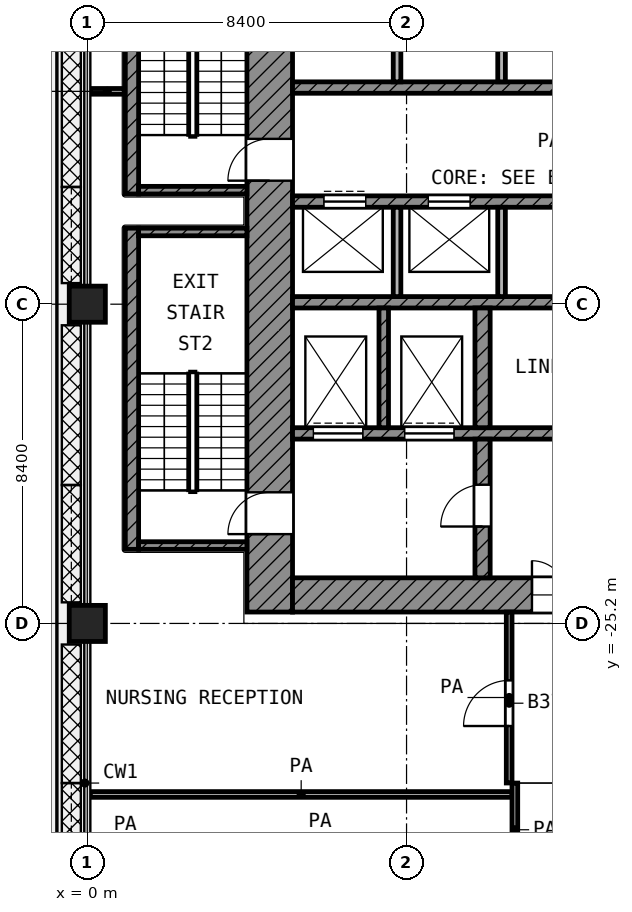
"""IFC4 building model, lengths in metres.
Left out: names, types, materials, properties, quantities, classifications, styles, units other than length and angle.
Written with IfcOpenShell. Run it as: python <this file> out.ifc"""

import sys

from ifc_helpers import new_model, si_unit, direction, frame, frame_2d, origin, origin_2d, place, context, subcontext, project, spatial, rectangle, extrude, element, fill, save


model = new_model("IFC4")
c1 = context("Model", 3, precision=1e-05, world=origin(), true_north=direction((0.0, 1.0)))
c2 = subcontext(c1, "Body", "Model", "MODEL_VIEW")
j1 = project(units=[si_unit("LENGTHUNIT", "METRE"), si_unit("PLANEANGLEUNIT", "RADIAN")], contexts=[c1])
p1 = place(None, origin())
s1 = spatial("IfcSite", under=j1, at=p1, CompositionType="ELEMENT")
p2 = place(p1, origin())
s2 = spatial("IfcBuilding", under=s1, at=p2, CompositionType="ELEMENT")
p3 = place(p2, frame((0.0, 0.0, 162.6)))
s3 = spatial("IfcBuildingStorey", under=s2, at=p3, CompositionType="ELEMENT", Elevation=162.6)
for number, where, z_axis, x_axis in (
    (1, (0.0, -16.8, 0.0), (0.0, 0.0, 1.0), (1.0, 0.0, 0.0)),
    (2, (0.0, -25.2, 0.0), (0.0, 0.0, 1.0), (1.0, 0.0, 0.0)),
):
    element("IfcColumn", number, at=place(p3, frame(where, z_axis=z_axis, x_axis=x_axis)), inside=s3, PredefinedType="COLUMN", context=c2, shape_type="SweptSolid", body=[
        extrude(rectangle(XDim=0.95, YDim=0.95, at=origin_2d()), origin(), (0.0, 0.0, 1.0), 4.2),
    ])
p4 = place(p3, frame((4.8, -24.9, 0.0), z_axis=(0.0, 0.0, 1.0), x_axis=(0.0, 1.0, 0.0)))
e3 = element("IfcWall", 3, at=p4, inside=s3, PredefinedType="SHEAR", context=c2, shape_type="SweptSolid", body=[
    extrude(rectangle(XDim=19.5, YDim=1.2, at=frame_2d((9.75, 0.0))), origin(), (0.0, 0.0, 1.0), 3.6),
])
p5 = place(p4, frame((11.35, 0.0, 0.0)))
e4 = element("IfcOpeningElement", 4, at=p5, cuts=e3, PredefinedType="OPENING", context=c2, shape_type="SweptSolid", body=[
    extrude(rectangle(XDim=1.1, YDim=2.1, at=frame_2d((0.55, 1.05))), frame((0.0, 0.61, 0.0), z_axis=(0.0, -1.0, 0.0), x_axis=(1.0, 0.0, 0.0)), (0.0, 0.0, 1.0), 1.22),
])
p6 = place(p4, frame((2.05, 0.0, 0.0)))
e5 = element("IfcOpeningElement", 5, at=p6, cuts=e3, PredefinedType="OPENING", context=c2, shape_type="SweptSolid", body=[
    extrude(rectangle(XDim=1.1, YDim=2.1, at=frame_2d((0.55, 1.05))), frame((0.0, 0.61, 0.0), z_axis=(0.0, -1.0, 0.0), x_axis=(1.0, 0.0, 0.0)), (0.0, 0.0, 1.0), 1.22),
])
p7 = place(p3, frame((5.4, -24.45, 0.0), z_axis=(0.0, 0.0, 1.0), x_axis=(1.0, 0.0, 0.0)))
e6 = element("IfcWall", 6, at=p7, inside=s3, PredefinedType="SHEAR", context=c2, shape_type="SweptSolid", body=[
    extrude(rectangle(XDim=18.6, YDim=0.9, at=frame_2d((9.3, 0.0))), origin(), (0.0, 0.0, 1.0), 3.6),
])
p8 = place(p7, frame((6.3, 0.0, 0.0)))
e7 = element("IfcOpeningElement", 7, at=p8, cuts=e6, PredefinedType="OPENING", context=c2, shape_type="SweptSolid", body=[
    extrude(rectangle(XDim=1.8, YDim=2.1, at=frame_2d((0.9, 1.05))), frame((0.0, 0.46, 0.0), z_axis=(0.0, -1.0, 0.0), x_axis=(1.0, 0.0, 0.0)), (0.0, 0.0, 1.0), 0.92),
])
p9 = place(p3, frame((5.4, -11.1, 0.0), z_axis=(0.0, 0.0, 1.0), x_axis=(1.0, 0.0, 0.0)))
e8 = element("IfcWall", 8, at=p9, inside=s3, PredefinedType="SHEAR", context=c2, shape_type="SweptSolid", body=[
    extrude(rectangle(XDim=16.65, YDim=0.3, at=frame_2d((8.325, 0.0))), origin(), (0.0, 0.0, 1.0), 3.6),
])
p10 = place(p9, frame((11.825, 0.0, 0.0)))
e9 = element("IfcOpeningElement", 9, at=p10, cuts=e8, PredefinedType="OPENING", context=c2, shape_type="SweptSolid", body=[
    extrude(rectangle(XDim=1.1, YDim=2.1, at=frame_2d((0.55, 1.05))), frame((0.0, 0.16, 0.0), z_axis=(0.0, -1.0, 0.0), x_axis=(1.0, 0.0, 0.0)), (0.0, 0.0, 1.0), 0.32),
])
p11 = place(p9, frame((14.575, 0.0, 0.0)))
e10 = element("IfcOpeningElement", 10, at=p11, cuts=e8, PredefinedType="OPENING", context=c2, shape_type="SweptSolid", body=[
    extrude(rectangle(XDim=1.1, YDim=2.1, at=frame_2d((0.55, 1.05))), frame((0.0, 0.16, 0.0), z_axis=(0.0, -1.0, 0.0), x_axis=(1.0, 0.0, 0.0)), (0.0, 0.0, 1.0), 0.32),
])
p12 = place(p3, frame((5.4, -14.1, 0.0), z_axis=(0.0, 0.0, 1.0), x_axis=(1.0, 0.0, 0.0)))
e11 = element("IfcWall", 11, at=p12, inside=s3, PredefinedType="SHEAR", context=c2, shape_type="SweptSolid", body=[
    extrude(rectangle(XDim=16.65, YDim=0.3, at=frame_2d((8.325, 0.0))), origin(), (0.0, 0.0, 1.0), 3.6),
])
p13 = place(p12, frame((0.825, 0.0, 0.0)))
e12 = element("IfcOpeningElement", 12, at=p13, cuts=e11, PredefinedType="OPENING", context=c2, shape_type="SweptSolid", body=[
    extrude(rectangle(XDim=1.1, YDim=2.1, at=frame_2d((0.55, 1.05))), frame((0.0, 0.16, 0.0), z_axis=(0.0, -1.0, 0.0), x_axis=(1.0, 0.0, 0.0)), (0.0, 0.0, 1.0), 0.32),
])
p14 = place(p12, frame((3.575, 0.0, 0.0)))
e13 = element("IfcOpeningElement", 13, at=p14, cuts=e11, PredefinedType="OPENING", context=c2, shape_type="SweptSolid", body=[
    extrude(rectangle(XDim=1.1, YDim=2.1, at=frame_2d((0.55, 1.05))), frame((0.0, 0.16, 0.0), z_axis=(0.0, -1.0, 0.0), x_axis=(1.0, 0.0, 0.0)), (0.0, 0.0, 1.0), 0.32),
])
p15 = place(p3, frame((5.4, -16.75, 0.0), z_axis=(0.0, 0.0, 1.0), x_axis=(1.0, 0.0, 0.0)))
e14 = element("IfcWall", 14, at=p15, inside=s3, PredefinedType="SHEAR", context=c2, shape_type="SweptSolid", body=[
    extrude(rectangle(XDim=16.65, YDim=0.3, at=frame_2d((8.325, 0.0))), origin(), (0.0, 0.0, 1.0), 3.6),
])
p16 = place(p3, frame((5.4, -20.2, 0.0), z_axis=(0.0, 0.0, 1.0), x_axis=(1.0, 0.0, 0.0)))
e15 = element("IfcWall", 15, at=p16, inside=s3, PredefinedType="SHEAR", context=c2, shape_type="SweptSolid", body=[
    extrude(rectangle(XDim=14.65, YDim=0.3, at=frame_2d((7.325, 0.0))), origin(), (0.0, 0.0, 1.0), 3.6),
])
p17 = place(p16, frame((10.55, 0.0, 0.0)))
e16 = element("IfcOpeningElement", 16, at=p17, cuts=e15, PredefinedType="OPENING", context=c2, shape_type="SweptSolid", body=[
    extrude(rectangle(XDim=1.3, YDim=2.1, at=frame_2d((0.65, 1.05))), frame((0.0, 0.16, 0.0), z_axis=(0.0, -1.0, 0.0), x_axis=(1.0, 0.0, 0.0)), (0.0, 0.0, 1.0), 0.32),
])
p18 = place(p16, frame((12.95, 0.0, 0.0)))
e17 = element("IfcOpeningElement", 17, at=p18, cuts=e15, PredefinedType="OPENING", context=c2, shape_type="SweptSolid", body=[
    extrude(rectangle(XDim=1.3, YDim=2.1, at=frame_2d((0.65, 1.05))), frame((0.0, 0.16, 0.0), z_axis=(0.0, -1.0, 0.0), x_axis=(1.0, 0.0, 0.0)), (0.0, 0.0, 1.0), 0.32),
])
p19 = place(p16, frame((0.55, 0.0, 0.0)))
e18 = element("IfcOpeningElement", 18, at=p19, cuts=e15, PredefinedType="OPENING", context=c2, shape_type="SweptSolid", body=[
    extrude(rectangle(XDim=1.3, YDim=2.1, at=frame_2d((0.65, 1.05))), frame((0.0, 0.16, 0.0), z_axis=(0.0, -1.0, 0.0), x_axis=(1.0, 0.0, 0.0)), (0.0, 0.0, 1.0), 0.32),
])
p20 = place(p16, frame((2.95, 0.0, 0.0)))
e19 = element("IfcOpeningElement", 19, at=p20, cuts=e15, PredefinedType="OPENING", context=c2, shape_type="SweptSolid", body=[
    extrude(rectangle(XDim=1.3, YDim=2.1, at=frame_2d((0.65, 1.05))), frame((0.0, 0.16, 0.0), z_axis=(0.0, -1.0, 0.0), x_axis=(1.0, 0.0, 0.0)), (0.0, 0.0, 1.0), 0.32),
])
p21 = place(p16, frame((7.15, 0.0, 0.0)))
e20 = element("IfcOpeningElement", 20, at=p21, cuts=e15, PredefinedType="OPENING", context=c2, shape_type="SweptSolid", body=[
    extrude(rectangle(XDim=0.9, YDim=2.1, at=frame_2d((0.45, 1.05))), frame((0.0, 0.16, 0.0), z_axis=(0.0, -1.0, 0.0), x_axis=(1.0, 0.0, 0.0)), (0.0, 0.0, 1.0), 0.32),
])
p22 = place(p3, frame((10.4, -24.0, 0.0), z_axis=(0.0, 0.0, 1.0), x_axis=(0.0, 1.0, 0.0)))
e21 = element("IfcWall", 21, at=p22, inside=s3, PredefinedType="SHEAR", context=c2, shape_type="SweptSolid", body=[
    extrude(rectangle(XDim=3.65, YDim=0.4, at=frame_2d((1.825, 0.0))), origin(), (0.0, 0.0, 1.0), 3.6),
])
p23 = place(p22, frame((1.35, 0.0, 0.0)))
e22 = element("IfcOpeningElement", 22, at=p23, cuts=e21, PredefinedType="OPENING", context=c2, shape_type="SweptSolid", body=[
    extrude(rectangle(XDim=1.1, YDim=2.1, at=frame_2d((0.55, 1.05))), frame((0.0, 0.21, 0.0), z_axis=(0.0, -1.0, 0.0), x_axis=(1.0, 0.0, 0.0)), (0.0, 0.0, 1.0), 0.42),
])
p24 = place(p3, frame((10.4, -20.05, 0.0), z_axis=(0.0, 0.0, 1.0), x_axis=(0.0, 1.0, 0.0)))
e23 = element("IfcWall", 23, at=p24, inside=s3, PredefinedType="SHEAR", context=c2, shape_type="SweptSolid", body=[
    extrude(rectangle(XDim=3.15, YDim=0.4, at=frame_2d((1.575, 0.0))), origin(), (0.0, 0.0, 1.0), 3.6),
])
p25 = place(p3, frame((7.8, -20.05, 0.0), z_axis=(0.0, 0.0, 1.0), x_axis=(0.0, 1.0, 0.0)))
e24 = element("IfcWall", 24, at=p25, inside=s3, PredefinedType="SHEAR", context=c2, shape_type="SweptSolid", body=[
    extrude(rectangle(XDim=3.15, YDim=0.25, at=frame_2d((1.575, 0.0))), origin(), (0.0, 0.0, 1.0), 3.6),
])
for number, where, z_axis, x_axis in (
    (25, (8.15, -10.95, 0.0), (0.0, 0.0, 1.0), (0.0, 1.0, 0.0)),
    (26, (10.9, -10.95, 0.0), (0.0, 0.0, 1.0), (0.0, 1.0, 0.0)),
):
    element("IfcWall", number, at=place(p3, frame(where, z_axis=z_axis, x_axis=x_axis)), inside=s3, PredefinedType="PARTITIONING", context=c2, shape_type="SweptSolid", body=[
        extrude(rectangle(XDim=2.35, YDim=0.2, at=frame_2d((1.175, 0.0))), origin(), (0.0, 0.0, 1.0), 3.6),
    ])
for number, where, z_axis, x_axis in (
    (27, (8.15, -16.6, 0.0), (0.0, 0.0, 1.0), (0.0, 1.0, 0.0)),
    (28, (10.9, -16.6, 0.0), (0.0, 0.0, 1.0), (0.0, 1.0, 0.0)),
):
    element("IfcWall", number, at=place(p3, frame(where, z_axis=z_axis, x_axis=x_axis)), inside=s3, PredefinedType="PARTITIONING", context=c2, shape_type="SweptSolid", body=[
        extrude(rectangle(XDim=2.35, YDim=0.2, at=frame_2d((1.175, 0.0))), origin(), (0.0, 0.0, 1.0), 3.6),
    ])
p26 = place(p3, frame((1.175, -13.9, 0.0), z_axis=(0.0, 0.0, 1.0), x_axis=(0.0, 1.0, 0.0)))
e29 = element("IfcWall", 29, at=p26, inside=s3, PredefinedType="SHEAR", context=c2, shape_type="SweptSolid", body=[
    extrude(rectangle(XDim=8.45, YDim=0.35, at=frame_2d((4.225, 0.0))), origin(), (0.0, 0.0, 1.0), 3.6),
])
p27 = place(p3, frame((1.35, -13.8, 0.0), z_axis=(0.0, 0.0, 1.0), x_axis=(1.0, 0.0, 0.0)))
e30 = element("IfcWall", 30, at=p27, inside=s3, PredefinedType="SHEAR", context=c2, shape_type="SweptSolid", body=[
    extrude(rectangle(XDim=2.85, YDim=0.2, at=frame_2d((1.425, 0.0))), origin(), (0.0, 0.0, 1.0), 3.6),
])
p28 = place(p3, frame((1.175, -23.25, 0.0), z_axis=(0.0, 0.0, 1.0), x_axis=(0.0, 1.0, 0.0)))
e31 = element("IfcWall", 31, at=p28, inside=s3, PredefinedType="SHEAR", context=c2, shape_type="SweptSolid", body=[
    extrude(rectangle(XDim=8.45, YDim=0.35, at=frame_2d((4.225, 0.0))), origin(), (0.0, 0.0, 1.0), 3.6),
])
for number, where, z_axis, x_axis in (
    (32, (1.35, -14.9, 0.0), (0.0, 0.0, 1.0), (1.0, 0.0, 0.0)),
    (33, (1.35, -23.15, 0.0), (0.0, 0.0, 1.0), (1.0, 0.0, 0.0)),
):
    element("IfcWall", number, at=place(p3, frame(where, z_axis=z_axis, x_axis=x_axis)), inside=s3, PredefinedType="SHEAR", context=c2, shape_type="SweptSolid", body=[
        extrude(rectangle(XDim=2.85, YDim=0.2, at=frame_2d((1.425, 0.0))), origin(), (0.0, 0.0, 1.0), 3.6),
    ])
p29 = place(p3, frame((0.08, -29.7, 0.0), z_axis=(0.0, 0.0, 1.0), x_axis=(1.0, 0.0, 0.0)))
e34 = element("IfcWall", 34, at=p29, inside=s3, PredefinedType="PARTITIONING", context=c2, shape_type="SweptSolid", body=[
    extrude(rectangle(XDim=11.095, YDim=0.15, at=frame_2d((5.547, 0.0))), origin(), (0.0, 0.0, 1.0), 3.6),
])
p30 = place(p3, frame((0.08, -11.2, 0.0), z_axis=(0.0, 0.0, 1.0), x_axis=(1.0, 0.0, 0.0)))
e35 = element("IfcWall", 35, at=p30, inside=s3, PredefinedType="PARTITIONING", context=c2, shape_type="SweptSolid", body=[
    extrude(rectangle(XDim=0.89, YDim=0.15, at=frame_2d((0.445, 0.0))), origin(), (0.0, 0.0, 1.0), 3.6),
])
p31 = place(p3, frame((11.1, -29.398, 0.0), z_axis=(0.0, 0.0, 1.0), x_axis=(0.0, 1.0, 0.0)))
e36 = element("IfcWall", 36, at=p31, inside=s3, PredefinedType="PARTITIONING", context=c2, shape_type="SweptSolid", body=[
    extrude(rectangle(XDim=4.498, YDim=0.15, at=frame_2d((2.249, 0.0))), origin(), (0.0, 0.0, 1.0), 3.6),
])
p32 = place(p31, frame((1.499, 0.0, 0.0)))
e37 = element("IfcOpeningElement", 37, at=p32, cuts=e36, PredefinedType="OPENING", context=c2, shape_type="SweptSolid", body=[
    extrude(rectangle(XDim=1.2, YDim=2.1, at=frame_2d((0.6, 1.05))), frame((0.0, 0.085, 0.0), z_axis=(0.0, -1.0, 0.0), x_axis=(1.0, 0.0, 0.0)), (0.0, 0.0, 1.0), 0.17),
])
p33 = place(p3, frame((11.25, -31.857, 0.0), z_axis=(0.0, 0.0, 1.0), x_axis=(0.0, 1.0, 0.0)))
e38 = element("IfcWall", 38, at=p33, inside=s3, PredefinedType="PARTITIONING", context=c2, shape_type="SweptSolid", body=[
    extrude(rectangle(XDim=2.457, YDim=0.15, at=frame_2d((1.229, 0.0))), origin(), (0.0, 0.0, 1.0), 3.6),
])
p34 = place(p13, origin())
e39 = element("IfcDoor", 39, at=p34, inside=s3, OperationType="DOUBLE_DOOR_SLIDING", PredefinedType="DOOR", context=c2, shape_type="SweptSolid", body=[
    extrude(rectangle(XDim=1.1, YDim=2.1, at=frame_2d((0.55, 1.05))), frame((0.0, 0.025, 0.0), z_axis=(0.0, -1.0, 0.0), x_axis=(1.0, 0.0, 0.0)), (0.0, 0.0, 1.0), 0.05),
])
fill(e12, e39)
p35 = place(p14, origin())
e40 = element("IfcDoor", 40, at=p35, inside=s3, OperationType="DOUBLE_DOOR_SLIDING", PredefinedType="DOOR", context=c2, shape_type="SweptSolid", body=[
    extrude(rectangle(XDim=1.1, YDim=2.1, at=frame_2d((0.55, 1.05))), frame((0.0, 0.025, 0.0), z_axis=(0.0, -1.0, 0.0), x_axis=(1.0, 0.0, 0.0)), (0.0, 0.0, 1.0), 0.05),
])
fill(e13, e40)
p36 = place(p19, origin())
e41 = element("IfcDoor", 41, at=p36, inside=s3, OperationType="DOUBLE_DOOR_SLIDING", PredefinedType="DOOR", context=c2, shape_type="SweptSolid", body=[
    extrude(rectangle(XDim=1.3, YDim=2.1, at=frame_2d((0.65, 1.05))), frame((0.0, 0.025, 0.0), z_axis=(0.0, -1.0, 0.0), x_axis=(1.0, 0.0, 0.0)), (0.0, 0.0, 1.0), 0.05),
])
fill(e18, e41)
p37 = place(p20, origin())
e42 = element("IfcDoor", 42, at=p37, inside=s3, OperationType="DOUBLE_DOOR_SLIDING", PredefinedType="DOOR", context=c2, shape_type="SweptSolid", body=[
    extrude(rectangle(XDim=1.3, YDim=2.1, at=frame_2d((0.65, 1.05))), frame((0.0, 0.025, 0.0), z_axis=(0.0, -1.0, 0.0), x_axis=(1.0, 0.0, 0.0)), (0.0, 0.0, 1.0), 0.05),
])
fill(e19, e42)
p38 = place(p5, origin())
e43 = element("IfcDoor", 43, at=p38, inside=s3, OperationType="SINGLE_SWING_LEFT", PredefinedType="DOOR", context=c2, shape_type="SweptSolid", body=[
    extrude(rectangle(XDim=1.1, YDim=2.1, at=frame_2d((0.55, 1.05))), frame((0.0, 0.025, 0.0), z_axis=(0.0, -1.0, 0.0), x_axis=(1.0, 0.0, 0.0)), (0.0, 0.0, 1.0), 0.05),
])
fill(e4, e43)
p39 = place(p6, origin())
e44 = element("IfcDoor", 44, at=p39, inside=s3, OperationType="SINGLE_SWING_LEFT", PredefinedType="DOOR", context=c2, shape_type="SweptSolid", body=[
    extrude(rectangle(XDim=1.1, YDim=2.1, at=frame_2d((0.55, 1.05))), frame((0.0, 0.025, 0.0), z_axis=(0.0, -1.0, 0.0), x_axis=(1.0, 0.0, 0.0)), (0.0, 0.0, 1.0), 0.05),
])
fill(e5, e44)
p40 = place(p23, origin())
e45 = element("IfcDoor", 45, at=p40, inside=s3, OperationType="SINGLE_SWING_LEFT", PredefinedType="DOOR", context=c2, shape_type="SweptSolid", body=[
    extrude(rectangle(XDim=1.1, YDim=2.1, at=frame_2d((0.55, 1.05))), frame((0.0, 0.025, 0.0), z_axis=(0.0, -1.0, 0.0), x_axis=(1.0, 0.0, 0.0)), (0.0, 0.0, 1.0), 0.05),
])
fill(e22, e45)
p41 = place(p8, origin())
e46 = element("IfcDoor", 46, at=p41, inside=s3, OperationType="DOUBLE_DOOR_SINGLE_SWING", PredefinedType="DOOR", context=c2, shape_type="SweptSolid", body=[
    extrude(rectangle(XDim=1.8, YDim=2.1, at=frame_2d((0.9, 1.05))), frame((0.0, 0.025, 0.0), z_axis=(0.0, -1.0, 0.0), x_axis=(1.0, 0.0, 0.0)), (0.0, 0.0, 1.0), 0.05),
])
fill(e7, e46)
p42 = place(p32, origin())
e47 = element("IfcDoor", 47, at=p42, inside=s3, OperationType="SINGLE_SWING_LEFT", PredefinedType="DOOR", context=c2, shape_type="SweptSolid", body=[
    extrude(rectangle(XDim=1.2, YDim=2.1, at=frame_2d((0.6, 1.05))), frame((0.0, 0.025, 0.0), z_axis=(0.0, -1.0, 0.0), x_axis=(1.0, 0.0, 0.0)), (0.0, 0.0, 1.0), 0.05),
])
fill(e37, e47)
save(model, sys.argv[1])
